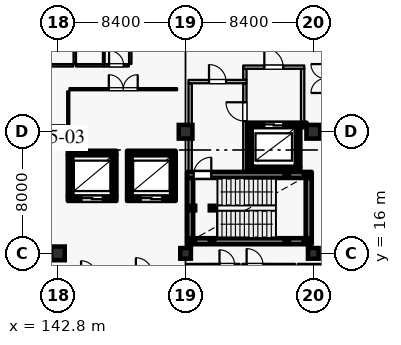
"""IFC4 building model, lengths in metres.
Left out: names, types, materials, properties, quantities, classifications, styles, units other than length and angle.
Written with IfcOpenShell. Run it as: python <this file> out.ifc"""

import sys

from ifc_helpers import new_model, si_unit, direction, frame, frame_2d, origin, origin_2d, place, context, subcontext, project, spatial, rectangle, hollow_rectangle, extrude, element, fill, save


model = new_model("IFC4")
c1 = context("Model", 3, precision=1e-05, world=origin(), true_north=direction((0.0, 1.0)))
c2 = subcontext(c1, "Body", "Model", "MODEL_VIEW")
j1 = project(units=[si_unit("LENGTHUNIT", "METRE"), si_unit("PLANEANGLEUNIT", "RADIAN")], contexts=[c1])
p1 = place(None, origin())
s1 = spatial("IfcSite", under=j1, at=p1, CompositionType="ELEMENT")
p2 = place(p1, origin())
s2 = spatial("IfcBuilding", under=s1, at=p2, CompositionType="ELEMENT")
p3 = place(p2, frame((0.0, 0.0, 11.4)))
s3 = spatial("IfcBuildingStorey", under=s2, at=p3, CompositionType="ELEMENT", Elevation=11.4)
for number, where, z_axis, x_axis in (
    (1, (142.8, 16.0, 0.0), (0.0, 0.0, 1.0), (1.0, 0.0, 0.0)),
    (2, (151.2, 24.0, 0.0), (0.0, 0.0, 1.0), (1.0, 0.0, 0.0)),
    (3, (159.6, 24.0, 0.0), (0.0, 0.0, 1.0), (1.0, 0.0, 0.0)),
):
    element("IfcColumn", number, at=place(p3, frame(where, z_axis=z_axis, x_axis=x_axis)), inside=s3, PredefinedType="COLUMN", context=c2, shape_type="SweptSolid", body=[
        extrude(rectangle(XDim=0.9, YDim=0.9, at=origin_2d()), origin(), (0.0, 0.0, 1.0), 4.8),
    ])
for number, where, z_axis, x_axis in (
    (4, (142.8, 24.0, 0.0), (0.0, 0.0, 1.0), (1.0, 0.0, 0.0)),
    (5, (151.2, 16.0, 0.0), (0.0, 0.0, 1.0), (1.0, 0.0, 0.0)),
    (6, (159.6, 16.0, 0.0), (0.0, 0.0, 1.0), (1.0, 0.0, 0.0)),
):
    element("IfcColumn", number, at=place(p3, frame(where, z_axis=z_axis, x_axis=x_axis)), inside=s3, PredefinedType="COLUMN", context=c2, shape_type="SweptSolid", body=[
        extrude(rectangle(XDim=0.7, YDim=0.7, at=origin_2d()), origin(), (0.0, 0.0, 1.0), 4.8),
    ])
p4 = place(p3, frame((167.6, 15.619, 0.0), z_axis=(0.0, 0.0, 1.0), x_axis=(-0.724156739794, -0.689635422677, 0.0)))
e7 = element("IfcWall", 7, at=p4, inside=s3, PredefinedType="SOLIDWALL", context=c2, shape_type="SweptSolid", body=[
    extrude(rectangle(XDim=10.495, YDim=0.24, at=frame_2d((5.248, 0.0))), origin(), (0.0, 0.0, 1.0), 4.13),
])
p5 = place(p4, frame((0.388, 0.0, 0.8)))
e8 = element("IfcOpeningElement", 8, at=p5, cuts=e7, PredefinedType="OPENING", context=c2, shape_type="SweptSolid", body=[
    extrude(rectangle(XDim=1.6, YDim=1.6, at=frame_2d((0.8, 0.8))), frame((0.0, 0.13, 0.0), z_axis=(0.0, -1.0, 0.0), x_axis=(1.0, 0.0, 0.0)), (0.0, 0.0, 1.0), 0.26),
])
p6 = place(p4, frame((4.234, 0.0, 0.8)))
e9 = element("IfcOpeningElement", 9, at=p6, cuts=e7, PredefinedType="OPENING", context=c2, shape_type="SweptSolid", body=[
    extrude(rectangle(XDim=1.6, YDim=1.6, at=frame_2d((0.8, 0.8))), frame((0.0, 0.13, 0.0), z_axis=(0.0, -1.0, 0.0), x_axis=(1.0, 0.0, 0.0)), (0.0, 0.0, 1.0), 0.26),
])
p7 = place(p4, frame((8.294, 0.0, 0.8)))
e10 = element("IfcOpeningElement", 10, at=p7, cuts=e7, PredefinedType="OPENING", context=c2, shape_type="SweptSolid", body=[
    extrude(rectangle(XDim=1.6, YDim=1.6, at=frame_2d((0.8, 0.8))), frame((0.0, 0.13, 0.0), z_axis=(0.0, -1.0, 0.0), x_axis=(1.0, 0.0, 0.0)), (0.0, 0.0, 1.0), 0.26),
])
p8 = place(p3, frame((155.25, 21.55, 0.0), z_axis=(0.0, 0.0, 1.0), x_axis=(1.0, 0.0, 0.0)))
e11 = element("IfcWall", 11, at=p8, inside=s3, PredefinedType="SHEAR", context=c2, shape_type="SweptSolid", body=[
    extrude(rectangle(XDim=3.5, YDim=0.3, at=frame_2d((1.75, 0.0))), origin(), (0.0, 0.0, 1.0), 4.535),
])
p9 = place(p3, frame((158.6, 21.705, 0.0), z_axis=(0.0, 0.0, 1.0), x_axis=(0.0, 1.0, 0.0)))
e12 = element("IfcWall", 12, at=p9, inside=s3, PredefinedType="SHEAR", context=c2, shape_type="SweptSolid", body=[
    extrude(rectangle(XDim=2.59, YDim=0.3, at=frame_2d((1.295, 0.0))), origin(), (0.0, 0.0, 1.0), 4.535),
])
p10 = place(p3, frame((159.16, 24.45, 0.0), z_axis=(0.0, 0.0, 1.0), x_axis=(-1.0, 0.0, 0.0)))
e13 = element("IfcWall", 13, at=p10, inside=s3, PredefinedType="SHEAR", context=c2, shape_type="SweptSolid", body=[
    extrude(rectangle(XDim=3.91, YDim=0.3, at=frame_2d((1.955, 0.0))), origin(), (0.0, 0.0, 1.0), 4.535),
])
p11 = place(p10, frame((1.535, 0.0, 0.0)))
e14 = element("IfcOpeningElement", 14, at=p11, cuts=e13, PredefinedType="OPENING", context=c2, shape_type="SweptSolid", body=[
    extrude(rectangle(XDim=1.25, YDim=2.25, at=frame_2d((0.625, 1.125))), frame((0.0, 0.16, 0.0), z_axis=(0.0, -1.0, 0.0), x_axis=(1.0, 0.0, 0.0)), (0.0, 0.0, 1.0), 0.32),
])
p12 = place(p3, frame((155.4, 24.295, 0.0), z_axis=(0.0, 0.0, 1.0), x_axis=(0.0, -1.0, 0.0)))
e15 = element("IfcWall", 15, at=p12, inside=s3, PredefinedType="SHEAR", context=c2, shape_type="SweptSolid", body=[
    extrude(rectangle(XDim=2.59, YDim=0.3, at=frame_2d((1.295, 0.0))), origin(), (0.0, 0.0, 1.0), 4.535),
])
p13 = place(p3, frame((143.45, 19.6, 0.0), z_axis=(0.0, 0.0, 1.0), x_axis=(1.0, 0.0, 0.0)))
e16 = element("IfcWall", 16, at=p13, inside=s3, PredefinedType="SHEAR", context=c2, shape_type="SweptSolid", body=[
    extrude(rectangle(XDim=3.2, YDim=0.3, at=frame_2d((1.6, 0.0))), origin(), (0.0, 0.0, 1.0), 4.535),
])
p14 = place(p13, frame((0.9, 0.0, 0.0)))
e17 = element("IfcOpeningElement", 17, at=p14, cuts=e16, PredefinedType="OPENING", context=c2, shape_type="SweptSolid", body=[
    extrude(rectangle(XDim=1.4, YDim=2.35, at=frame_2d((0.7, 1.175))), frame((0.0, 0.16, 0.0), z_axis=(0.0, -1.0, 0.0), x_axis=(1.0, 0.0, 0.0)), (0.0, 0.0, 1.0), 0.32),
])
p15 = place(p3, frame((146.5, 19.755, 0.0), z_axis=(0.0, 0.0, 1.0), x_axis=(0.0, 1.0, 0.0)))
e18 = element("IfcWall", 18, at=p15, inside=s3, PredefinedType="SHEAR", context=c2, shape_type="SweptSolid", body=[
    extrude(rectangle(XDim=2.69, YDim=0.3, at=frame_2d((1.345, 0.0))), origin(), (0.0, 0.0, 1.0), 4.535),
])
p16 = place(p3, frame((146.65, 22.6, 0.0), z_axis=(0.0, 0.0, 1.0), x_axis=(-1.0, 0.0, 0.0)))
e19 = element("IfcWall", 19, at=p16, inside=s3, PredefinedType="SHEAR", context=c2, shape_type="SweptSolid", body=[
    extrude(rectangle(XDim=3.2, YDim=0.3, at=frame_2d((1.6, 0.0))), origin(), (0.0, 0.0, 1.0), 4.535),
])
p17 = place(p3, frame((143.6, 22.445, 0.0), z_axis=(0.0, 0.0, 1.0), x_axis=(0.0, -1.0, 0.0)))
e20 = element("IfcWall", 20, at=p17, inside=s3, PredefinedType="SHEAR", context=c2, shape_type="SweptSolid", body=[
    extrude(rectangle(XDim=2.69, YDim=0.3, at=frame_2d((1.345, 0.0))), origin(), (0.0, 0.0, 1.0), 4.535),
])
p18 = place(p3, frame((147.35, 19.6, 0.0), z_axis=(0.0, 0.0, 1.0), x_axis=(1.0, 0.0, 0.0)))
e21 = element("IfcWall", 21, at=p18, inside=s3, PredefinedType="SHEAR", context=c2, shape_type="SweptSolid", body=[
    extrude(rectangle(XDim=3.2, YDim=0.3, at=frame_2d((1.6, 0.0))), origin(), (0.0, 0.0, 1.0), 4.535),
])
p19 = place(p18, frame((0.9, 0.0, 0.0)))
e22 = element("IfcOpeningElement", 22, at=p19, cuts=e21, PredefinedType="OPENING", context=c2, shape_type="SweptSolid", body=[
    extrude(rectangle(XDim=1.4, YDim=2.35, at=frame_2d((0.7, 1.175))), frame((0.0, 0.16, 0.0), z_axis=(0.0, -1.0, 0.0), x_axis=(1.0, 0.0, 0.0)), (0.0, 0.0, 1.0), 0.32),
])
p20 = place(p3, frame((150.4, 19.755, 0.0), z_axis=(0.0, 0.0, 1.0), x_axis=(0.0, 1.0, 0.0)))
e23 = element("IfcWall", 23, at=p20, inside=s3, PredefinedType="SHEAR", context=c2, shape_type="SweptSolid", body=[
    extrude(rectangle(XDim=2.69, YDim=0.3, at=frame_2d((1.345, 0.0))), origin(), (0.0, 0.0, 1.0), 4.535),
])
p21 = place(p3, frame((150.55, 22.6, 0.0), z_axis=(0.0, 0.0, 1.0), x_axis=(-1.0, 0.0, 0.0)))
e24 = element("IfcWall", 24, at=p21, inside=s3, PredefinedType="SHEAR", context=c2, shape_type="SweptSolid", body=[
    extrude(rectangle(XDim=3.2, YDim=0.3, at=frame_2d((1.6, 0.0))), origin(), (0.0, 0.0, 1.0), 4.535),
])
p22 = place(p3, frame((147.5, 22.445, 0.0), z_axis=(0.0, 0.0, 1.0), x_axis=(0.0, -1.0, 0.0)))
e25 = element("IfcWall", 25, at=p22, inside=s3, PredefinedType="SHEAR", context=c2, shape_type="SweptSolid", body=[
    extrude(rectangle(XDim=2.69, YDim=0.3, at=frame_2d((1.345, 0.0))), origin(), (0.0, 0.0, 1.0), 4.535),
])
p23 = place(p3, frame((151.3, 16.8, 0.0), z_axis=(0.0, 0.0, 1.0), x_axis=(1.0, 0.0, 0.0)))
e26 = element("IfcWall", 26, at=p23, inside=s3, PredefinedType="SHEAR", context=c2, shape_type="SweptSolid", body=[
    extrude(rectangle(XDim=8.2, YDim=0.4, at=frame_2d((4.1, 0.0))), origin(), (0.0, 0.0, 1.0), 4.535),
])
p24 = place(p3, frame((159.3, 17.005, 0.0), z_axis=(0.0, 0.0, 1.0), x_axis=(0.0, 1.0, 0.0)))
e27 = element("IfcWall", 27, at=p24, inside=s3, PredefinedType="SHEAR", context=c2, shape_type="SweptSolid", body=[
    extrude(rectangle(XDim=3.95, YDim=0.4, at=frame_2d((1.975, 0.0))), origin(), (0.0, 0.0, 1.0), 4.535),
])
p25 = place(p3, frame((151.3, 21.16, 0.0), z_axis=(0.0, 0.0, 1.0), x_axis=(1.0, 0.0, 0.0)))
e28 = element("IfcWall", 28, at=p25, inside=s3, PredefinedType="SHEAR", context=c2, shape_type="SweptSolid", body=[
    extrude(rectangle(XDim=8.2, YDim=0.4, at=frame_2d((4.1, 0.0))), origin(), (0.0, 0.0, 1.0), 4.535),
])
p26 = place(p25, frame((0.43, 0.0, 0.0)))
e29 = element("IfcOpeningElement", 29, at=p26, cuts=e28, PredefinedType="OPENING", context=c2, shape_type="SweptSolid", body=[
    extrude(rectangle(XDim=1.16, YDim=2.2, at=frame_2d((0.58, 1.1))), frame((0.0, 0.21, 0.0), z_axis=(0.0, -1.0, 0.0), x_axis=(1.0, 0.0, 0.0)), (0.0, 0.0, 1.0), 0.42),
])
p27 = place(p3, frame((151.5, 17.005, 0.0), z_axis=(0.0, 0.0, 1.0), x_axis=(0.0, 1.0, 0.0)))
e30 = element("IfcWall", 30, at=p27, inside=s3, PredefinedType="SHEAR", context=c2, shape_type="SweptSolid", body=[
    extrude(rectangle(XDim=3.95, YDim=0.4, at=frame_2d((1.975, 0.0))), origin(), (0.0, 0.0, 1.0), 4.535),
])
p28 = place(p3, frame((151.5, 21.365, 0.0), z_axis=(0.0, 0.0, 1.0), x_axis=(0.0, 1.0, 0.0)))
e31 = element("IfcWall", 31, at=p28, inside=s3, PredefinedType="PARTITIONING", context=c2, shape_type="SweptSolid", body=[
    extrude(rectangle(XDim=5.82, YDim=0.22, at=frame_2d((2.91, 0.0))), origin(), (0.0, 0.0, 1.0), 4.535),
])
p29 = place(p3, frame((151.39, 27.3, 0.0), z_axis=(0.0, 0.0, 1.0), x_axis=(1.0, 0.0, 0.0)))
e32 = element("IfcWall", 32, at=p29, inside=s3, PredefinedType="PARTITIONING", context=c2, shape_type="SweptSolid", body=[
    extrude(rectangle(XDim=3.82, YDim=0.22, at=frame_2d((1.91, 0.0))), origin(), (0.0, 0.0, 1.0), 4.535),
])
p30 = place(p29, frame((1.35, 0.0, 0.0)))
e33 = element("IfcOpeningElement", 33, at=p30, cuts=e32, PredefinedType="OPENING", context=c2, shape_type="SweptSolid", body=[
    extrude(rectangle(XDim=1.12, YDim=2.2, at=frame_2d((0.56, 1.1))), frame((0.0, 0.12, 0.0), z_axis=(0.0, -1.0, 0.0), x_axis=(1.0, 0.0, 0.0)), (0.0, 0.0, 1.0), 0.24),
])
p31 = place(p3, frame((155.1, 21.365, 0.0), z_axis=(0.0, 0.0, 1.0), x_axis=(0.0, 1.0, 0.0)))
e34 = element("IfcWall", 34, at=p31, inside=s3, PredefinedType="PARTITIONING", context=c2, shape_type="SweptSolid", body=[
    extrude(rectangle(XDim=5.82, YDim=0.22, at=frame_2d((2.91, 0.0))), origin(), (0.0, 0.0, 1.0), 4.535),
])
p32 = place(p31, frame((3.335, 0.0, 0.0)))
e35 = element("IfcOpeningElement", 35, at=p32, cuts=e34, PredefinedType="OPENING", context=c2, shape_type="SweptSolid", body=[
    extrude(rectangle(XDim=1.24, YDim=2.2, at=frame_2d((0.62, 1.1))), frame((0.0, 0.12, 0.0), z_axis=(0.0, -1.0, 0.0), x_axis=(1.0, 0.0, 0.0)), (0.0, 0.0, 1.0), 0.24),
])
p33 = place(p3, frame((155.1, 27.415, 0.0), z_axis=(0.0, 0.0, 1.0), x_axis=(0.0, 1.0, 0.0)))
e36 = element("IfcWall", 36, at=p33, inside=s3, PredefinedType="PARTITIONING", context=c2, shape_type="SweptSolid", body=[
    extrude(rectangle(XDim=0.72, YDim=0.22, at=frame_2d((0.36, 0.0))), origin(), (0.0, 0.0, 1.0), 4.535),
])
p34 = place(p3, frame((158.9, 24.605, 0.0), z_axis=(0.0, 0.0, 1.0), x_axis=(0.0, 1.0, 0.0)))
e37 = element("IfcWall", 37, at=p34, inside=s3, PredefinedType="PARTITIONING", context=c2, shape_type="SweptSolid", body=[
    extrude(rectangle(XDim=3.53, YDim=0.22, at=frame_2d((1.765, 0.0))), origin(), (0.0, 0.0, 1.0), 4.535),
])
p35 = place(p3, frame((154.99, 28.25, 0.0), z_axis=(0.0, 0.0, 1.0), x_axis=(1.0, 0.0, 0.0)))
e38 = element("IfcWall", 38, at=p35, inside=s3, PredefinedType="PARTITIONING", context=c2, shape_type="SweptSolid", body=[
    extrude(rectangle(XDim=4.02, YDim=0.22, at=frame_2d((2.01, 0.0))), origin(), (0.0, 0.0, 1.0), 4.535),
])
p36 = place(p35, frame((1.39, 0.0, 0.0)))
e39 = element("IfcOpeningElement", 39, at=p36, cuts=e38, PredefinedType="OPENING", context=c2, shape_type="SweptSolid", body=[
    extrude(rectangle(XDim=1.24, YDim=2.2, at=frame_2d((0.62, 1.1))), frame((0.0, 0.12, 0.0), z_axis=(0.0, -1.0, 0.0), x_axis=(1.0, 0.0, 0.0)), (0.0, 0.0, 1.0), 0.24),
])
for number, where, z_axis, x_axis in (
    (40, (151.68, 16.8, 0.0), (0.0, 0.0, 1.0), (1.0, 0.0, 0.0)),
    (41, (151.68, 18.98, 0.0), (0.0, 0.0, 1.0), (1.0, 0.0, 0.0)),
    (42, (152.94, 16.8, 0.0), (0.0, 0.0, 1.0), (1.0, 0.0, 0.0)),
    (43, (152.94, 18.98, 0.0), (0.0, 0.0, 1.0), (1.0, 0.0, 0.0)),
):
    element("IfcColumn", number, at=place(p3, frame(where, z_axis=z_axis, x_axis=x_axis)), inside=s3, PredefinedType="COLUMN", context=c2, shape_type="SweptSolid", body=[
        extrude(hollow_rectangle(XDim=0.3, YDim=0.3, WallThickness=0.012, at=origin_2d()), origin(), (0.0, 0.0, 1.0), 4.62),
    ])
for number, where, z_axis, x_axis in (
    (44, (157.86, 16.8, -2.7), (0.0, 0.0, 1.0), (1.0, 0.0, 0.0)),
    (45, (157.86, 21.16, -2.7), (0.0, 0.0, 1.0), (1.0, 0.0, 0.0)),
    (46, (159.12, 16.8, -2.7), (0.0, 0.0, 1.0), (1.0, 0.0, 0.0)),
    (47, (159.12, 21.16, -2.7), (0.0, 0.0, 1.0), (1.0, 0.0, 0.0)),
):
    element("IfcColumn", number, at=place(p3, frame(where, z_axis=z_axis, x_axis=x_axis)), inside=s3, PredefinedType="COLUMN", context=c2, shape_type="SweptSolid", body=[
        extrude(hollow_rectangle(XDim=0.3, YDim=0.3, WallThickness=0.012, at=origin_2d()), origin(), (0.0, 0.0, 1.0), 4.92),
    ])
for number, where, z_axis, x_axis in (
    (48, (142.01, 28.37, 0.0), (0.0, 0.0, 1.0), (1.0, 0.0, 0.0)),
    (49, (144.0, 28.37, 0.0), (0.0, 0.0, 1.0), (1.0, 0.0, 0.0)),
):
    element("IfcWall", number, at=place(p3, frame(where, z_axis=z_axis, x_axis=x_axis)), inside=s3, PredefinedType="PARTITIONING", context=c2, shape_type="SweptSolid", body=[
        extrude(rectangle(XDim=1.81, YDim=0.16, at=frame_2d((0.905, 0.0))), origin(), (0.0, 0.0, 1.0), 4.535),
    ])
p37 = place(p3, frame((145.82, 28.37, 0.0), z_axis=(0.0, 0.0, 1.0), x_axis=(1.0, 0.0, 0.0)))
e50 = element("IfcWall", 50, at=p37, inside=s3, PredefinedType="PARTITIONING", context=c2, shape_type="SweptSolid", body=[
    extrude(rectangle(XDim=1.65, YDim=0.16, at=frame_2d((0.825, 0.0))), origin(), (0.0, 0.0, 1.0), 4.535),
])
p38 = place(p37, frame((0.345, 0.0, 0.0)))
e51 = element("IfcOpeningElement", 51, at=p38, cuts=e50, PredefinedType="OPENING", context=c2, shape_type="SweptSolid", body=[
    extrude(rectangle(XDim=0.96, YDim=2.2, at=frame_2d((0.48, 1.1))), frame((0.0, 0.09, 0.0), z_axis=(0.0, -1.0, 0.0), x_axis=(1.0, 0.0, 0.0)), (0.0, 0.0, 1.0), 0.18),
])
p39 = place(p3, frame((145.82, 28.46, 0.0), z_axis=(0.0, 0.0, 1.0), x_axis=(0.0, 1.0, 0.0)))
e52 = element("IfcWall", 52, at=p39, inside=s3, PredefinedType="PARTITIONING", context=c2, shape_type="SweptSolid", body=[
    extrude(rectangle(XDim=2.45, YDim=0.115, at=frame_2d((1.225, 0.0))), origin(), (0.0, 0.0, 1.0), 4.535),
])
for number, where, z_axis, x_axis in (
    (53, (143.91, 28.46, 0.0), (0.0, 0.0, 1.0), (0.0, 1.0, 0.0)),
    (54, (147.56, 28.46, 0.0), (0.0, 0.0, 1.0), (0.0, 1.0, 0.0)),
):
    element("IfcWall", number, at=place(p3, frame(where, z_axis=z_axis, x_axis=x_axis)), inside=s3, PredefinedType="PARTITIONING", context=c2, shape_type="SweptSolid", body=[
        extrude(rectangle(XDim=4.26, YDim=0.16, at=frame_2d((2.13, 0.0))), origin(), (0.0, 0.0, 1.0), 4.535),
    ])
p40 = place(p3, frame((151.29, 15.23, 0.0), z_axis=(0.0, 0.0, 1.0), x_axis=(1.0, 0.0, 0.0)))
e55 = element("IfcWall", 55, at=p40, inside=s3, PredefinedType="PARTITIONING", context=c2, shape_type="SweptSolid", body=[
    extrude(rectangle(XDim=1.81, YDim=0.16, at=frame_2d((0.905, 0.0))), origin(), (0.0, 0.0, 1.0), 4.535),
])
p41 = place(p3, frame((153.11, 15.23, 0.0), z_axis=(0.0, 0.0, 1.0), x_axis=(1.0, 0.0, 0.0)))
e56 = element("IfcWall", 56, at=p41, inside=s3, PredefinedType="PARTITIONING", context=c2, shape_type="SweptSolid", body=[
    extrude(rectangle(XDim=1.64, YDim=0.16, at=frame_2d((0.82, 0.0))), origin(), (0.0, 0.0, 1.0), 4.535),
])
p42 = place(p41, frame((0.32, 0.0, 0.0)))
e57 = element("IfcOpeningElement", 57, at=p42, cuts=e56, PredefinedType="OPENING", context=c2, shape_type="SweptSolid", body=[
    extrude(rectangle(XDim=1.0, YDim=2.25, at=frame_2d((0.5, 1.125))), frame((0.0, 0.09, 0.0), z_axis=(0.0, -1.0, 0.0), x_axis=(1.0, 0.0, 0.0)), (0.0, 0.0, 1.0), 0.18),
])
p43 = place(p3, frame((154.93, 15.23, 0.0), z_axis=(0.0, 0.0, 1.0), x_axis=(1.0, 0.0, 0.0)))
e58 = element("IfcWall", 58, at=p43, inside=s3, PredefinedType="PARTITIONING", context=c2, shape_type="SweptSolid", body=[
    extrude(rectangle(XDim=1.65, YDim=0.16, at=frame_2d((0.825, 0.0))), origin(), (0.0, 0.0, 1.0), 4.535),
])
p44 = place(p43, frame((0.285, 0.0, 0.0)))
e59 = element("IfcOpeningElement", 59, at=p44, cuts=e58, PredefinedType="OPENING", context=c2, shape_type="SweptSolid", body=[
    extrude(rectangle(XDim=1.08, YDim=2.3, at=frame_2d((0.54, 1.15))), frame((0.0, 0.09, 0.0), z_axis=(0.0, -1.0, 0.0), x_axis=(1.0, 0.0, 0.0)), (0.0, 0.0, 1.0), 0.18),
])
for number, where, z_axis, x_axis in (
    (60, (156.59, 15.23, 0.0), (0.0, 0.0, 1.0), (1.0, 0.0, 0.0)),
    (61, (158.58, 15.23, 0.0), (0.0, 0.0, 1.0), (1.0, 0.0, 0.0)),
):
    element("IfcWall", number, at=place(p3, frame(where, z_axis=z_axis, x_axis=x_axis)), inside=s3, PredefinedType="PARTITIONING", context=c2, shape_type="SweptSolid", body=[
        extrude(rectangle(XDim=1.81, YDim=0.16, at=frame_2d((0.905, 0.0))), origin(), (0.0, 0.0, 1.0), 4.535),
    ])
p45 = place(p3, frame((143.56, 26.8, 0.0), z_axis=(0.0, 0.0, 1.0), x_axis=(1.0, 0.0, 0.0)))
e62 = element("IfcWall", 62, at=p45, inside=s3, PredefinedType="PARTITIONING", context=c2, shape_type="SweptSolid", body=[
    extrude(rectangle(XDim=7.08, YDim=0.14, at=frame_2d((3.54, 0.0))), origin(), (0.0, 0.0, 1.0), 4.535),
])
p46 = place(p45, frame((2.59, 0.0, 0.0)))
e63 = element("IfcOpeningElement", 63, at=p46, cuts=e62, PredefinedType="OPENING", context=c2, shape_type="SweptSolid", body=[
    extrude(rectangle(XDim=1.9, YDim=2.4, at=frame_2d((0.95, 1.2))), frame((0.0, 0.08, 0.0), z_axis=(0.0, -1.0, 0.0), x_axis=(1.0, 0.0, 0.0)), (0.0, 0.0, 1.0), 0.16),
])
p47 = place(p3, frame((143.48, 23.45, 0.0), z_axis=(0.0, 0.0, 1.0), x_axis=(0.0, 1.0, 0.0)))
e64 = element("IfcWall", 64, at=p47, inside=s3, PredefinedType="PARTITIONING", context=c2, shape_type="SweptSolid", body=[
    extrude(rectangle(XDim=3.21, YDim=0.14, at=frame_2d((1.605, 0.0))), origin(), (0.0, 0.0, 1.0), 4.535),
])
p48 = place(p11, origin())
e65 = element("IfcDoor", 65, at=p48, inside=s3, OperationType="DOUBLE_DOOR_SLIDING", PredefinedType="DOOR", context=c2, shape_type="SweptSolid", body=[
    extrude(rectangle(XDim=1.25, YDim=2.25, at=frame_2d((0.625, 1.125))), frame((0.0, 0.025, 0.0), z_axis=(0.0, -1.0, 0.0), x_axis=(1.0, 0.0, 0.0)), (0.0, 0.0, 1.0), 0.05),
])
fill(e14, e65)
p49 = place(p14, origin())
e66 = element("IfcDoor", 66, at=p49, inside=s3, OperationType="DOUBLE_DOOR_SLIDING", PredefinedType="DOOR", context=c2, shape_type="SweptSolid", body=[
    extrude(rectangle(XDim=1.4, YDim=2.35, at=frame_2d((0.7, 1.175))), frame((0.0, 0.025, 0.0), z_axis=(0.0, -1.0, 0.0), x_axis=(1.0, 0.0, 0.0)), (0.0, 0.0, 1.0), 0.05),
])
fill(e17, e66)
p50 = place(p19, origin())
e67 = element("IfcDoor", 67, at=p50, inside=s3, OperationType="DOUBLE_DOOR_SLIDING", PredefinedType="DOOR", context=c2, shape_type="SweptSolid", body=[
    extrude(rectangle(XDim=1.4, YDim=2.35, at=frame_2d((0.7, 1.175))), frame((0.0, 0.025, 0.0), z_axis=(0.0, -1.0, 0.0), x_axis=(1.0, 0.0, 0.0)), (0.0, 0.0, 1.0), 0.05),
])
fill(e22, e67)
p51 = place(p26, origin())
e68 = element("IfcDoor", 68, at=p51, inside=s3, OperationType="SINGLE_SWING_RIGHT", PredefinedType="DOOR", context=c2, shape_type="SweptSolid", body=[
    extrude(rectangle(XDim=1.16, YDim=2.2, at=frame_2d((0.58, 1.1))), frame((0.0, 0.025, 0.0), z_axis=(0.0, -1.0, 0.0), x_axis=(1.0, 0.0, 0.0)), (0.0, 0.0, 1.0), 0.05),
])
fill(e29, e68)
p52 = place(p30, origin())
e69 = element("IfcDoor", 69, at=p52, inside=s3, OperationType="SINGLE_SWING_LEFT", PredefinedType="DOOR", context=c2, shape_type="SweptSolid", body=[
    extrude(rectangle(XDim=1.12, YDim=2.2, at=frame_2d((0.56, 1.1))), frame((0.0, 0.025, 0.0), z_axis=(0.0, -1.0, 0.0), x_axis=(1.0, 0.0, 0.0)), (0.0, 0.0, 1.0), 0.05),
])
fill(e33, e69)
p53 = place(p32, origin())
e70 = element("IfcDoor", 70, at=p53, inside=s3, OperationType="SINGLE_SWING_RIGHT", PredefinedType="DOOR", context=c2, shape_type="SweptSolid", body=[
    extrude(rectangle(XDim=1.24, YDim=2.2, at=frame_2d((0.62, 1.1))), frame((0.0, 0.025, 0.0), z_axis=(0.0, -1.0, 0.0), x_axis=(1.0, 0.0, 0.0)), (0.0, 0.0, 1.0), 0.05),
])
fill(e35, e70)
p54 = place(p36, origin())
e71 = element("IfcDoor", 71, at=p54, inside=s3, OperationType="SINGLE_SWING_LEFT", PredefinedType="DOOR", context=c2, shape_type="SweptSolid", body=[
    extrude(rectangle(XDim=1.24, YDim=2.2, at=frame_2d((0.62, 1.1))), frame((0.0, 0.025, 0.0), z_axis=(0.0, -1.0, 0.0), x_axis=(1.0, 0.0, 0.0)), (0.0, 0.0, 1.0), 0.05),
])
fill(e39, e71)
p55 = place(p38, origin())
e72 = element("IfcDoor", 72, at=p55, inside=s3, OperationType="SINGLE_SWING_LEFT", PredefinedType="DOOR", context=c2, shape_type="SweptSolid", body=[
    extrude(rectangle(XDim=0.96, YDim=2.2, at=frame_2d((0.48, 1.1))), frame((0.0, 0.025, 0.0), z_axis=(0.0, -1.0, 0.0), x_axis=(1.0, 0.0, 0.0)), (0.0, 0.0, 1.0), 0.05),
])
fill(e51, e72)
p56 = place(p42, origin())
e73 = element("IfcDoor", 73, at=p56, inside=s3, OperationType="SINGLE_SWING_LEFT", PredefinedType="DOOR", context=c2, shape_type="SweptSolid", body=[
    extrude(rectangle(XDim=1.0, YDim=2.25, at=frame_2d((0.5, 1.125))), frame((0.0, 0.025, 0.0), z_axis=(0.0, -1.0, 0.0), x_axis=(1.0, 0.0, 0.0)), (0.0, 0.0, 1.0), 0.05),
])
fill(e57, e73)
p57 = place(p44, origin())
e74 = element("IfcDoor", 74, at=p57, inside=s3, OperationType="SINGLE_SWING_LEFT", PredefinedType="DOOR", context=c2, shape_type="SweptSolid", body=[
    extrude(rectangle(XDim=1.08, YDim=2.3, at=frame_2d((0.54, 1.15))), frame((0.0, 0.025, 0.0), z_axis=(0.0, -1.0, 0.0), x_axis=(1.0, 0.0, 0.0)), (0.0, 0.0, 1.0), 0.05),
])
fill(e59, e74)
p58 = place(p46, origin())
e75 = element("IfcDoor", 75, at=p58, inside=s3, OperationType="DOUBLE_DOOR_SINGLE_SWING", PredefinedType="DOOR", context=c2, shape_type="SweptSolid", body=[
    extrude(rectangle(XDim=1.9, YDim=2.4, at=frame_2d((0.95, 1.2))), frame((0.0, 0.025, 0.0), z_axis=(0.0, -1.0, 0.0), x_axis=(1.0, 0.0, 0.0)), (0.0, 0.0, 1.0), 0.05),
])
fill(e63, e75)
save(model, sys.argv[1])
